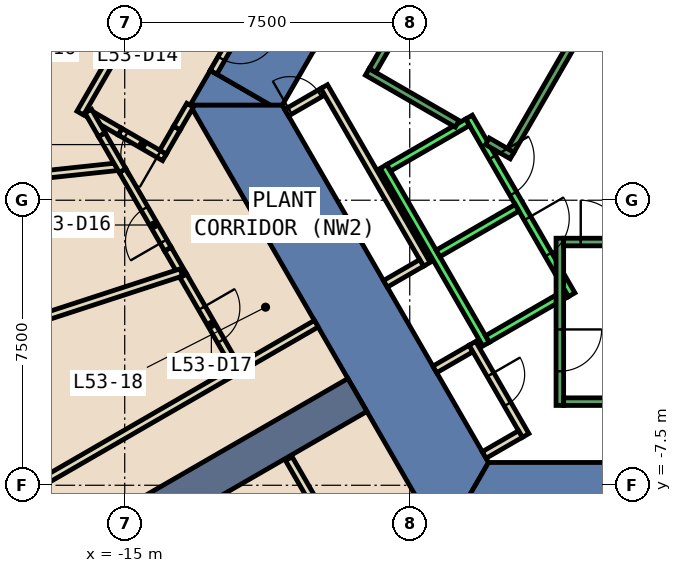
"""IFC4 building model, lengths in metres.
Left out: names, types, materials, properties, quantities, classifications, styles, units other than length and angle.
Written with IfcOpenShell. Run it as: python <this file> out.ifc"""

import sys

from ifc_helpers import new_model, si_unit, direction, frame, frame_2d, origin, place, context, subcontext, project, spatial, polyline, rectangle, outline, extrude, element, fill, save


model = new_model("IFC4")
c1 = context("Model", 3, precision=1e-05, world=origin(), true_north=direction((0.0, 1.0)))
c2 = subcontext(c1, "Body", "Model", "MODEL_VIEW")
j1 = project(units=[si_unit("LENGTHUNIT", "METRE"), si_unit("PLANEANGLEUNIT", "RADIAN")], contexts=[c1])
p1 = place(None, origin())
s1 = spatial("IfcSite", under=j1, at=p1, CompositionType="ELEMENT")
p2 = place(p1, origin())
s2 = spatial("IfcBuilding", under=s1, at=p2, CompositionType="ELEMENT")
p3 = place(p2, frame((0.0, 0.0, 236.0)))
s3 = spatial("IfcBuildingStorey", under=s2, at=p3, CompositionType="ELEMENT", Elevation=236.0)
p4 = place(p3, frame((0.0, 0.0, -0.6)))
e1 = element("IfcWall", 1, at=p4, inside=s3, PredefinedType="SHEAR", context=c2, shape_type="SweptSolid", body=[
    extrude(outline(polyline([(-11.16, 2.5), (-12.749, 3.417), (-13.279, 2.5), (-11.16, 2.5)])), origin(), (0.0, 0.0, 1.0), 5.4),
])
p5 = place(p3, frame((0.0, 0.0, 3.6)))
e2 = element("IfcWall", 2, at=p5, inside=s3, PredefinedType="SHEAR", context=c2, shape_type="SweptSolid", body=[
    extrude(outline(polyline([(-12.749, 3.417), (-11.16, 2.5), (-10.854, 2.5), (-10.016, 3.952), (-11.834, 5.002), (-12.749, 3.417)])), origin(), (0.0, 0.0, 1.0), 1.2),
])
p6 = place(p3, frame((0.0, 0.0, -0.6)))
e3 = element("IfcWall", 3, at=p6, inside=s3, PredefinedType="SHEAR", context=c2, shape_type="SweptSolid", body=[
    extrude(outline(polyline([(-13.279, 2.5), (-6.64, -9.0), (-5.427, -6.9), (-10.854, 2.5), (-13.279, 2.5)])), origin(), (0.0, 0.0, 1.0), 5.4),
])
p7 = place(p3, frame((0.0, 0.0, -0.6)))
e4 = element("IfcWall", 4, at=p7, inside=s3, PredefinedType="SHEAR", context=c2, shape_type="SweptSolid", body=[
    extrude(outline(polyline([(3.75, -9.0), (3.75, -6.9), (-5.427, -6.9), (-6.64, -9.0), (3.75, -9.0)])), origin(), (0.0, 0.0, 1.0), 5.4),
])
p8 = place(p3, frame((-8.877, -5.125, 0.0), z_axis=(0.0, 0.0, 1.0), x_axis=(-0.866032640494, -0.499987465442, 0.0)))
e5 = element("IfcWall", 5, at=p8, inside=s3, PredefinedType="SHEAR", context=c2, shape_type="SweptSolid", body=[
    extrude(rectangle(XDim=23.232, YDim=1.0, at=frame_2d((11.616, 0.0))), origin(), (0.0, 0.0, 1.0), 4.8),
])
p9 = place(p3, frame((-10.741, 2.303, 0.0), z_axis=(0.0, 0.0, 1.0), x_axis=(0.866063652425, 0.499933745558, 0.0)))
e6 = element("IfcWall", 6, at=p9, inside=s3, PredefinedType="PARTITIONING", context=c2, shape_type="SweptSolid", body=[
    extrude(rectangle(XDim=1.1, YDim=0.2, at=frame_2d((0.55, 0.0))), origin(), (0.0, 0.0, 1.0), 4.8),
])
p10 = place(p9, frame((0.1, 0.0, 0.0)))
e7 = element("IfcOpeningElement", 7, at=p10, cuts=e6, PredefinedType="OPENING", context=c2, shape_type="SweptSolid", body=[
    extrude(rectangle(XDim=0.9, YDim=2.1, at=frame_2d((0.45, 1.05))), frame((0.0, 0.11, 0.0), z_axis=(0.0, -1.0, 0.0), x_axis=(1.0, 0.0, 0.0)), (0.0, 0.0, 1.0), 0.22),
])
p11 = place(p3, frame((-9.751, 2.99, 0.0), z_axis=(0.0, 0.0, 1.0), x_axis=(0.499955951776, -0.866050833545, 0.0)))
e8 = element("IfcWall", 8, at=p11, inside=s3, PredefinedType="PARTITIONING", context=c2, shape_type="SweptSolid", body=[
    extrude(rectangle(XDim=5.4, YDim=0.2, at=frame_2d((2.7, 0.0))), origin(), (0.0, 0.0, 1.0), 4.8),
])
p12 = place(p3, frame((-7.188, -1.65, 0.0), z_axis=(0.0, 0.0, 1.0), x_axis=(-0.865841558281, -0.500318294642, 0.0)))
e9 = element("IfcWall", 9, at=p12, inside=s3, PredefinedType="PARTITIONING", context=c2, shape_type="SweptSolid", body=[
    extrude(rectangle(XDim=1.099, YDim=0.2, at=frame_2d((0.55, 0.0))), origin(), (0.0, 0.0, 1.0), 4.8),
])
p13 = place(p3, frame((-6.841, -4.452, 0.0), z_axis=(0.0, 0.0, 1.0), x_axis=(0.86621513555, 0.499671230855, 0.0)))
e10 = element("IfcWall", 10, at=p13, inside=s3, PredefinedType="PARTITIONING", context=c2, shape_type="SweptSolid", body=[
    extrude(rectangle(XDim=1.1, YDim=0.2, at=frame_2d((0.55, 0.0))), origin(), (0.0, 0.0, 1.0), 4.8),
])
p14 = place(p3, frame((-5.851, -3.765, 0.0), z_axis=(0.0, 0.0, 1.0), x_axis=(0.500011755427, -0.866018616679, 0.0)))
e11 = element("IfcWall", 11, at=p14, inside=s3, PredefinedType="PARTITIONING", context=c2, shape_type="SweptSolid", body=[
    extrude(rectangle(XDim=2.8, YDim=0.2, at=frame_2d((1.4, 0.0))), origin(), (0.0, 0.0, 1.0), 4.8),
])
p15 = place(p14, frame((0.95, 0.0, 0.0)))
e12 = element("IfcOpeningElement", 12, at=p15, cuts=e11, PredefinedType="OPENING", context=c2, shape_type="SweptSolid", body=[
    extrude(rectangle(XDim=0.9, YDim=2.1, at=frame_2d((0.45, 1.05))), frame((0.0, 0.11, 0.0), z_axis=(0.0, -1.0, 0.0), x_axis=(1.0, 0.0, 0.0)), (0.0, 0.0, 1.0), 0.22),
])
p16 = place(p3, frame((-4.588, -6.153, 0.0), z_axis=(0.0, 0.0, 1.0), x_axis=(-0.86621513555, -0.499671230855, 0.0)))
e13 = element("IfcWall", 13, at=p16, inside=s3, PredefinedType="PARTITIONING", context=c2, shape_type="SweptSolid", body=[
    extrude(rectangle(XDim=1.1, YDim=0.2, at=frame_2d((0.55, 0.0))), origin(), (0.0, 0.0, 1.0), 4.8),
])
p17 = place(p3, frame((-2.54, 5.1, 0.0), z_axis=(0.0, 0.0, 1.0), x_axis=(0.499925051871, -0.866068670783, 0.0)))
e14 = element("IfcWall", 14, at=p17, inside=s3, PredefinedType="PARTITIONING", context=c2, shape_type="SweptSolid", body=[
    extrude(rectangle(XDim=5.181, YDim=0.2, at=frame_2d((2.59, 0.0))), origin(), (0.0, 0.0, 1.0), 4.8),
])
p18 = place(p17, frame((2.04, 0.0, 0.0)))
e15 = element("IfcOpeningElement", 15, at=p18, cuts=e14, PredefinedType="OPENING", context=c2, shape_type="SweptSolid", body=[
    extrude(rectangle(XDim=1.0, YDim=2.1, at=frame_2d((0.5, 1.05))), frame((0.0, 0.11, 0.0), z_axis=(0.0, -1.0, 0.0), x_axis=(1.0, 0.0, 0.0)), (0.0, 0.0, 1.0), 0.22),
])
p19 = place(p3, frame((-7.976, -11.487, 0.0), z_axis=(0.0, 0.0, 1.0), x_axis=(-0.499909942208, 0.866077392432, 0.0)))
e16 = element("IfcWall", 16, at=p19, inside=s3, PredefinedType="PARTITIONING", context=c2, shape_type="SweptSolid", body=[
    extrude(rectangle(XDim=5.411, YDim=0.2, at=frame_2d((2.705, 0.0))), origin(), (0.0, 0.0, 1.0), 4.8),
])
p20 = place(p19, frame((1.111, 0.0, 0.0)))
e17 = element("IfcOpeningElement", 17, at=p20, cuts=e16, PredefinedType="OPENING", context=c2, shape_type="SweptSolid", body=[
    extrude(rectangle(XDim=1.0, YDim=2.1, at=frame_2d((0.5, 1.05))), frame((0.0, 0.11, 0.0), z_axis=(0.0, -1.0, 0.0), x_axis=(1.0, 0.0, 0.0)), (0.0, 0.0, 1.0), 0.22),
])
p21 = place(p3, frame((-13.955, 1.129, 0.0), z_axis=(0.0, 0.0, 1.0), x_axis=(-0.86610721073, 0.499858279437, 0.0)))
e18 = element("IfcWall", 18, at=p21, inside=s3, PredefinedType="PARTITIONING", context=c2, shape_type="SweptSolid", body=[
    extrude(rectangle(XDim=1.349, YDim=0.2, at=frame_2d((0.674, 0.0))), origin(), (0.0, 0.0, 1.0), 2.4),
])
p22 = place(p21, frame((0.17, 0.0, 0.0)))
e19 = element("IfcOpeningElement", 19, at=p22, cuts=e18, PredefinedType="OPENING", context=c2, shape_type="SweptSolid", body=[
    extrude(rectangle(XDim=1.0, YDim=2.1, at=frame_2d((0.5, 1.05))), frame((0.0, 0.11, 0.0), z_axis=(0.0, -1.0, 0.0), x_axis=(1.0, 0.0, 0.0)), (0.0, 0.0, 1.0), 0.22),
])
p23 = place(p3, frame((-13.992, 1.266, 0.0), z_axis=(0.0, 0.0, 1.0), x_axis=(0.500049712553, 0.865996700326, 0.0)))
e20 = element("IfcWall", 20, at=p23, inside=s3, PredefinedType="PARTITIONING", context=c2, shape_type="SweptSolid", body=[
    extrude(rectangle(XDim=0.732, YDim=0.2, at=frame_2d((0.366, 0.0))), origin(), (0.0, 0.0, 1.0), 2.4),
])
p24 = place(p3, frame((-16.17, 2.292, 0.0), z_axis=(0.0, 0.0, 1.0), x_axis=(0.499942581134, 0.866058552045, 0.0)))
e21 = element("IfcWall", 21, at=p24, inside=s3, PredefinedType="PARTITIONING", context=c2, shape_type="SweptSolid", body=[
    extrude(rectangle(XDim=7.2, YDim=0.2, at=frame_2d((3.6, 0.0))), origin(), (0.0, 0.0, 1.0), 4.8),
])
p25 = place(p24, frame((2.51, 0.0, 0.0)))
e22 = element("IfcOpeningElement", 22, at=p25, cuts=e21, PredefinedType="OPENING", context=c2, shape_type="SweptSolid", body=[
    extrude(rectangle(XDim=1.0, YDim=2.1, at=frame_2d((0.5, 1.05))), frame((0.0, 0.11, 0.0), z_axis=(0.0, -1.0, 0.0), x_axis=(1.0, 0.0, 0.0)), (0.0, 0.0, 1.0), 0.22),
])
p26 = place(p3, frame((-13.46, -1.987, 0.0), z_axis=(0.0, 0.0, 1.0), x_axis=(-0.499670304667, 0.866215669815, 0.0)))
e23 = element("IfcWall", 23, at=p26, inside=s3, PredefinedType="PARTITIONING", context=c2, shape_type="SweptSolid", body=[
    extrude(rectangle(XDim=0.811, YDim=0.2, at=frame_2d((0.405, 0.0))), origin(), (0.0, 0.0, 1.0), 2.4),
])
p27 = place(p3, frame((-13.46, -1.987, 0.0), z_axis=(0.0, 0.0, 1.0), x_axis=(0.499980071345, -0.866036909293, 0.0)))
e24 = element("IfcWall", 24, at=p27, inside=s3, PredefinedType="PARTITIONING", context=c2, shape_type="SweptSolid", body=[
    extrude(rectangle(XDim=2.844, YDim=0.2, at=frame_2d((1.422, 0.0))), origin(), (0.0, 0.0, 1.0), 4.8),
])
p28 = place(p27, frame((0.98, 0.0, 0.0)))
e25 = element("IfcOpeningElement", 25, at=p28, cuts=e24, PredefinedType="OPENING", context=c2, shape_type="SweptSolid", body=[
    extrude(rectangle(XDim=1.0, YDim=2.1, at=frame_2d((0.5, 1.05))), frame((0.0, 0.11, 0.0), z_axis=(0.0, -1.0, 0.0), x_axis=(1.0, 0.0, 0.0)), (0.0, 0.0, 1.0), 0.22),
])
p29 = place(p3, frame((-15.12, 0.889, 0.0), z_axis=(0.0, 0.0, 1.0), x_axis=(-0.994370100713, -0.105962742547, 0.0)))
e26 = element("IfcWall", 26, at=p29, inside=s3, PredefinedType="PARTITIONING", context=c2, shape_type="SweptSolid", body=[
    extrude(rectangle(XDim=6.832, YDim=0.2, at=frame_2d((3.416, 0.0))), origin(), (0.0, 0.0, 1.0), 2.4),
])
p30 = place(p3, frame((-13.51, -1.9, 0.0), z_axis=(0.0, 0.0, 1.0), x_axis=(-0.950838276897, -0.309687860897, 0.0)))
e27 = element("IfcWall", 27, at=p30, inside=s3, PredefinedType="PARTITIONING", context=c2, shape_type="SweptSolid", body=[
    extrude(rectangle(XDim=16.336, YDim=0.2, at=frame_2d((8.168, 0.0))), origin(), (0.0, 0.0, 1.0), 2.4),
])
p31 = place(p3, frame((-11.748, 4.952, 0.0), z_axis=(0.0, 0.0, 1.0), x_axis=(-0.500215337403, -0.865901042976, 0.0)))
e28 = element("IfcWall", 28, at=p31, inside=s3, PredefinedType="PARTITIONING", context=c2, shape_type="SweptSolid", body=[
    extrude(rectangle(XDim=1.829, YDim=0.2, at=frame_2d((0.915, 0.0))), origin(), (0.0, 0.0, 1.0), 2.4),
])
p32 = place(p31, frame((0.415, 0.0, 0.0)))
e29 = element("IfcOpeningElement", 29, at=p32, cuts=e28, PredefinedType="OPENING", context=c2, shape_type="SweptSolid", body=[
    extrude(rectangle(XDim=1.0, YDim=2.1, at=frame_2d((0.5, 1.05))), frame((0.0, 0.11, 0.0), z_axis=(0.0, -1.0, 0.0), x_axis=(1.0, 0.0, 0.0)), (0.0, 0.0, 1.0), 0.22),
])
p33 = place(p3, frame((-30.173, -14.92, 0.0), z_axis=(0.0, 0.0, 1.0), x_axis=(0.866038403425, 0.499977483287, 0.0)))
e30 = element("IfcWall", 30, at=p33, inside=s3, PredefinedType="PARTITIONING", context=c2, shape_type="SweptSolid", body=[
    extrude(rectangle(XDim=23.341, YDim=0.2, at=frame_2d((11.67, 0.0))), origin(), (0.0, 0.0, 1.0), 4.8),
])
p34 = place(p3, frame((-15.123, 1.803, 0.0), z_axis=(0.0, 0.0, 1.0), x_axis=(-0.865652990476, 0.500644484719, 0.0)))
e31 = element("IfcWall", 31, at=p34, inside=s3, PredefinedType="PARTITIONING", context=c2, shape_type="SweptSolid", body=[
    extrude(rectangle(XDim=0.909, YDim=0.2, at=frame_2d((0.455, 0.0))), origin(), (0.0, 0.0, 1.0), 4.8),
])
p35 = place(p3, frame((-13.626, 1.9, 0.0), z_axis=(0.0, 0.0, 1.0), x_axis=(0.500494699761, 0.86573960029, 0.0)))
e32 = element("IfcWall", 32, at=p35, inside=s3, PredefinedType="PARTITIONING", context=c2, shape_type="SweptSolid", body=[
    extrude(rectangle(XDim=0.693, YDim=0.2, at=frame_2d((0.347, 0.0))), origin(), (0.0, 0.0, 1.0), 4.8),
])
p36 = place(p3, frame((-13.865, -1.285, 0.0), z_axis=(0.0, 0.0, 1.0), x_axis=(-0.499905644439, 0.86607987314, 0.0)))
e33 = element("IfcWall", 33, at=p36, inside=s3, PredefinedType="PARTITIONING", context=c2, shape_type="SweptSolid", body=[
    extrude(rectangle(XDim=2.384, YDim=0.2, at=frame_2d((1.192, 0.0))), origin(), (0.0, 0.0, 1.0), 4.8),
])
p37 = place(p36, frame((0.231, 0.0, 0.0)))
e34 = element("IfcOpeningElement", 34, at=p37, cuts=e33, PredefinedType="OPENING", context=c2, shape_type="SweptSolid", body=[
    extrude(rectangle(XDim=1.0, YDim=2.1, at=frame_2d((0.5, 1.05))), frame((0.0, 0.11, 0.0), z_axis=(0.0, -1.0, 0.0), x_axis=(1.0, 0.0, 0.0)), (0.0, 0.0, 1.0), 0.22),
])
p38 = place(p3, frame((-15.057, 0.78, 0.0), z_axis=(0.0, 0.0, 1.0), x_axis=(-0.500348398615, 0.865824162289, 0.0)))
e35 = element("IfcWall", 35, at=p38, inside=s3, PredefinedType="PARTITIONING", context=c2, shape_type="SweptSolid", body=[
    extrude(rectangle(XDim=1.092, YDim=0.2, at=frame_2d((0.546, 0.0))), origin(), (0.0, 0.0, 1.0), 2.4),
])
p39 = place(p3, frame((-15.603, 1.725, 0.0), z_axis=(0.0, 0.0, 1.0), x_axis=(-0.499594255707, 0.866259533664, 0.0)))
e36 = element("IfcWall", 36, at=p39, inside=s3, PredefinedType="PARTITIONING", context=c2, shape_type="SweptSolid", body=[
    extrude(rectangle(XDim=0.714, YDim=0.2, at=frame_2d((0.357, 0.0))), origin(), (0.0, 0.0, 1.0), 4.8),
])
p40 = place(p3, frame((-5.94, 2.188, 0.0), z_axis=(0.0, 0.0, 1.0), x_axis=(0.500034260056, -0.866005622828, 0.0)))
e37 = element("IfcWall", 37, at=p40, inside=s3, PredefinedType="STANDARD", context=c2, shape_type="SweptSolid", body=[
    extrude(rectangle(XDim=5.399, YDim=0.2, at=frame_2d((2.7, 0.0))), origin(), (0.0, 0.0, 1.0), 4.8),
])
p41 = place(p40, frame((3.075, 0.0, 0.0)))
e38 = element("IfcOpeningElement", 38, at=p41, cuts=e37, PredefinedType="OPENING", context=c2, shape_type="SweptSolid", body=[
    extrude(rectangle(XDim=1.1, YDim=2.1, at=frame_2d((0.55, 1.05))), frame((0.0, 0.11, 0.0), z_axis=(0.0, -1.0, 0.0), x_axis=(1.0, 0.0, 0.0)), (0.0, 0.0, 1.0), 0.22),
])
p42 = place(p40, frame((1.225, 0.0, 0.0)))
e39 = element("IfcOpeningElement", 39, at=p42, cuts=e37, PredefinedType="OPENING", context=c2, shape_type="SweptSolid", body=[
    extrude(rectangle(XDim=1.1, YDim=2.1, at=frame_2d((0.55, 1.05))), frame((0.0, 0.11, 0.0), z_axis=(0.0, -1.0, 0.0), x_axis=(1.0, 0.0, 0.0)), (0.0, 0.0, 1.0), 0.22),
])
p43 = place(p3, frame((-8.192, 0.888, 0.0), z_axis=(0.0, 0.0, 1.0), x_axis=(0.500034260056, -0.866005622828, 0.0)))
e40 = element("IfcWall", 40, at=p43, inside=s3, PredefinedType="STANDARD", context=c2, shape_type="SweptSolid", body=[
    extrude(rectangle(XDim=5.399, YDim=0.2, at=frame_2d((2.7, 0.0))), origin(), (0.0, 0.0, 1.0), 4.8),
])
for number, where, z_axis, x_axis in (
    (41, (-5.977, 2.052, 0.0), (0.0, 0.0, 1.0), (-0.866, -0.5, 0.0)),
    (42, (-4.677, -0.2, 0.0), (0.0, 0.0, 1.0), (-0.866, -0.5, 0.0)),
):
    element("IfcWall", number, at=place(p3, frame(where, z_axis=z_axis, x_axis=x_axis)), inside=s3, PredefinedType="STANDARD", context=c2, shape_type="SweptSolid", body=[
        extrude(rectangle(XDim=2.399, YDim=0.2, at=frame_2d((1.2, 0.0))), origin(), (0.0, 0.0, 1.0), 4.8),
    ])
p44 = place(p3, frame((-3.377, -2.452, 0.0), z_axis=(0.0, 0.0, 1.0), x_axis=(-0.865955154139, -0.50012165622, 0.0)))
e43 = element("IfcWall", 43, at=p44, inside=s3, PredefinedType="STANDARD", context=c2, shape_type="SweptSolid", body=[
    extrude(rectangle(XDim=2.4, YDim=0.2, at=frame_2d((1.2, 0.0))), origin(), (0.0, 0.0, 1.0), 4.8),
])
p45 = place(p3, frame((-3.55, -1.0, 0.0), z_axis=(0.0, 0.0, 1.0), x_axis=(0.0, -1.0, 0.0)))
e44 = element("IfcWall", 44, at=p45, inside=s3, PredefinedType="STANDARD", context=c2, shape_type="SweptSolid", body=[
    extrude(rectangle(XDim=4.4, YDim=0.2, at=frame_2d((2.2, 0.0))), origin(), (0.0, 0.0, 1.0), 4.8),
])
p46 = place(p45, frame((2.4, 0.0, 0.0)))
e45 = element("IfcOpeningElement", 45, at=p46, cuts=e44, PredefinedType="OPENING", context=c2, shape_type="SweptSolid", body=[
    extrude(rectangle(XDim=1.1, YDim=2.2, at=frame_2d((0.55, 1.1))), frame((0.0, 0.11, 0.0), z_axis=(0.0, -1.0, 0.0), x_axis=(1.0, 0.0, 0.0)), (0.0, 0.0, 1.0), 0.22),
])
p47 = place(p3, frame((-3.45, -1.1, 0.0), z_axis=(0.0, 0.0, 1.0), x_axis=(1.0, 0.0, 0.0)))
e46 = element("IfcWall", 46, at=p47, inside=s3, PredefinedType="STANDARD", context=c2, shape_type="SweptSolid", body=[
    extrude(rectangle(XDim=6.9, YDim=0.2, at=frame_2d((3.45, 0.0))), origin(), (0.0, 0.0, 1.0), 4.8),
])
p48 = place(p47, frame((0.45, 0.0, 0.0)))
e47 = element("IfcOpeningElement", 47, at=p48, cuts=e46, PredefinedType="OPENING", context=c2, shape_type="SweptSolid", body=[
    extrude(rectangle(XDim=1.1, YDim=2.2, at=frame_2d((0.55, 1.1))), frame((0.0, 0.11, 0.0), z_axis=(0.0, -1.0, 0.0), x_axis=(1.0, 0.0, 0.0)), (0.0, 0.0, 1.0), 0.22),
])
p49 = place(p3, frame((-3.45, -5.3, 0.0), z_axis=(0.0, 0.0, 1.0), x_axis=(1.0, 0.0, 0.0)))
e48 = element("IfcWall", 48, at=p49, inside=s3, PredefinedType="STANDARD", context=c2, shape_type="SweptSolid", body=[
    extrude(rectangle(XDim=6.9, YDim=0.2, at=frame_2d((3.45, 0.0))), origin(), (0.0, 0.0, 1.0), 4.8),
])
p50 = place(p3, frame((-6.25, 2.01, 0.0), z_axis=(0.0, 0.0, 1.0), x_axis=(-0.86611865017, 0.499838457731, 0.0)))
e49 = element("IfcWall", 49, at=p50, inside=s3, PredefinedType="STANDARD", context=c2, shape_type="SweptSolid", body=[
    extrude(rectangle(XDim=2.733, YDim=0.2, at=frame_2d((1.366, 0.0))), origin(), (0.0, 0.0, 1.0), 4.8),
])
p51 = place(p3, frame((-4.806, 1.176, 0.0), z_axis=(0.0, 0.0, 1.0), x_axis=(-0.866558586415, 0.499075361355, 0.0)))
e50 = element("IfcWall", 50, at=p51, inside=s3, PredefinedType="STANDARD", context=c2, shape_type="SweptSolid", body=[
    extrude(rectangle(XDim=0.751, YDim=0.2, at=frame_2d((0.376, 0.0))), origin(), (0.0, 0.0, 1.0), 4.8),
])
p52 = place(p3, frame((-1.393, 7.288, 0.0), z_axis=(0.0, 0.0, 1.0), x_axis=(-0.499963383562, -0.866046543262, 0.0)))
e51 = element("IfcWall", 51, at=p52, inside=s3, PredefinedType="STANDARD", context=c2, shape_type="SweptSolid", body=[
    extrude(rectangle(XDim=6.9, YDim=0.2, at=frame_2d((3.45, 0.0))), origin(), (0.0, 0.0, 1.0), 4.8),
])
p53 = place(p52, frame((0.45, 0.0, 0.0)))
e52 = element("IfcOpeningElement", 52, at=p53, cuts=e51, PredefinedType="OPENING", context=c2, shape_type="SweptSolid", body=[
    extrude(rectangle(XDim=1.1, YDim=2.2, at=frame_2d((0.55, 1.1))), frame((0.0, 0.11, 0.0), z_axis=(0.0, -1.0, 0.0), x_axis=(1.0, 0.0, 0.0)), (0.0, 0.0, 1.0), 0.22),
])
p54 = place(p3, frame((-5.03, 9.388, 0.0), z_axis=(0.0, 0.0, 1.0), x_axis=(-0.499978703459, -0.866037698999, 0.0)))
e53 = element("IfcWall", 53, at=p54, inside=s3, PredefinedType="STANDARD", context=c2, shape_type="SweptSolid", body=[
    extrude(rectangle(XDim=6.9, YDim=0.2, at=frame_2d((3.45, 0.0))), origin(), (0.0, 0.0, 1.0), 4.8),
])
p55 = place(p22, origin())
e54 = element("IfcDoor", 54, at=p55, inside=s3, OperationType="SINGLE_SWING_LEFT", PredefinedType="DOOR", context=c2, shape_type="SweptSolid", body=[
    extrude(rectangle(XDim=1.0, YDim=2.1, at=frame_2d((0.5, 1.05))), frame((0.0, 0.025, 0.0), z_axis=(0.0, -1.0, 0.0), x_axis=(1.0, 0.0, 0.0)), (0.0, 0.0, 1.0), 0.05),
])
fill(e19, e54)
p56 = place(p37, origin())
e55 = element("IfcDoor", 55, at=p56, inside=s3, OperationType="SINGLE_SWING_RIGHT", PredefinedType="DOOR", context=c2, shape_type="SweptSolid", body=[
    extrude(rectangle(XDim=1.0, YDim=2.1, at=frame_2d((0.5, 1.05))), frame((0.0, 0.025, 0.0), z_axis=(0.0, -1.0, 0.0), x_axis=(1.0, 0.0, 0.0)), (0.0, 0.0, 1.0), 0.05),
])
fill(e34, e55)
p57 = place(p28, origin())
e56 = element("IfcDoor", 56, at=p57, inside=s3, OperationType="SINGLE_SWING_LEFT", PredefinedType="DOOR", context=c2, shape_type="SweptSolid", body=[
    extrude(rectangle(XDim=1.0, YDim=2.1, at=frame_2d((0.5, 1.05))), frame((0.0, 0.025, 0.0), z_axis=(0.0, -1.0, 0.0), x_axis=(1.0, 0.0, 0.0)), (0.0, 0.0, 1.0), 0.05),
])
fill(e25, e56)
p58 = place(p10, origin())
e57 = element("IfcDoor", 57, at=p58, inside=s3, OperationType="SINGLE_SWING_RIGHT", PredefinedType="DOOR", context=c2, shape_type="SweptSolid", body=[
    extrude(rectangle(XDim=0.9, YDim=2.1, at=frame_2d((0.45, 1.05))), frame((0.0, 0.025, 0.0), z_axis=(0.0, -1.0, 0.0), x_axis=(1.0, 0.0, 0.0)), (0.0, 0.0, 1.0), 0.05),
])
fill(e7, e57)
p59 = place(p15, origin())
e58 = element("IfcDoor", 58, at=p59, inside=s3, OperationType="SINGLE_SWING_RIGHT", PredefinedType="DOOR", context=c2, shape_type="SweptSolid", body=[
    extrude(rectangle(XDim=0.9, YDim=2.1, at=frame_2d((0.45, 1.05))), frame((0.0, 0.025, 0.0), z_axis=(0.0, -1.0, 0.0), x_axis=(1.0, 0.0, 0.0)), (0.0, 0.0, 1.0), 0.05),
])
fill(e12, e58)
p60 = place(p32, origin())
e59 = element("IfcDoor", 59, at=p60, inside=s3, OperationType="SINGLE_SWING_LEFT", PredefinedType="DOOR", context=c2, shape_type="SweptSolid", body=[
    extrude(rectangle(XDim=1.0, YDim=2.1, at=frame_2d((0.5, 1.05))), frame((0.0, 0.025, 0.0), z_axis=(0.0, -1.0, 0.0), x_axis=(1.0, 0.0, 0.0)), (0.0, 0.0, 1.0), 0.05),
])
fill(e29, e59)
p61 = place(p41, origin())
e60 = element("IfcDoor", 60, at=p61, inside=s3, OperationType="SLIDING_TO_LEFT", PredefinedType="DOOR", context=c2, shape_type="SweptSolid", body=[
    extrude(rectangle(XDim=1.1, YDim=2.1, at=frame_2d((0.55, 1.05))), frame((0.0, 0.025, 0.0), z_axis=(0.0, -1.0, 0.0), x_axis=(1.0, 0.0, 0.0)), (0.0, 0.0, 1.0), 0.05),
])
fill(e38, e60)
p62 = place(p42, origin())
e61 = element("IfcDoor", 61, at=p62, inside=s3, OperationType="SLIDING_TO_LEFT", PredefinedType="DOOR", context=c2, shape_type="SweptSolid", body=[
    extrude(rectangle(XDim=1.1, YDim=2.1, at=frame_2d((0.55, 1.05))), frame((0.0, 0.025, 0.0), z_axis=(0.0, -1.0, 0.0), x_axis=(1.0, 0.0, 0.0)), (0.0, 0.0, 1.0), 0.05),
])
fill(e39, e61)
p63 = place(p48, origin())
e62 = element("IfcDoor", 62, at=p63, inside=s3, OperationType="SINGLE_SWING_LEFT", PredefinedType="DOOR", context=c2, shape_type="SweptSolid", body=[
    extrude(rectangle(XDim=1.1, YDim=2.2, at=frame_2d((0.55, 1.1))), frame((0.0, 0.025, 0.0), z_axis=(0.0, -1.0, 0.0), x_axis=(1.0, 0.0, 0.0)), (0.0, 0.0, 1.0), 0.05),
])
fill(e47, e62)
p64 = place(p46, origin())
e63 = element("IfcDoor", 63, at=p64, inside=s3, OperationType="SINGLE_SWING_LEFT", PredefinedType="DOOR", context=c2, shape_type="SweptSolid", body=[
    extrude(rectangle(XDim=1.1, YDim=2.2, at=frame_2d((0.55, 1.1))), frame((0.0, 0.025, 0.0), z_axis=(0.0, -1.0, 0.0), x_axis=(1.0, 0.0, 0.0)), (0.0, 0.0, 1.0), 0.05),
])
fill(e45, e63)
save(model, sys.argv[1])
